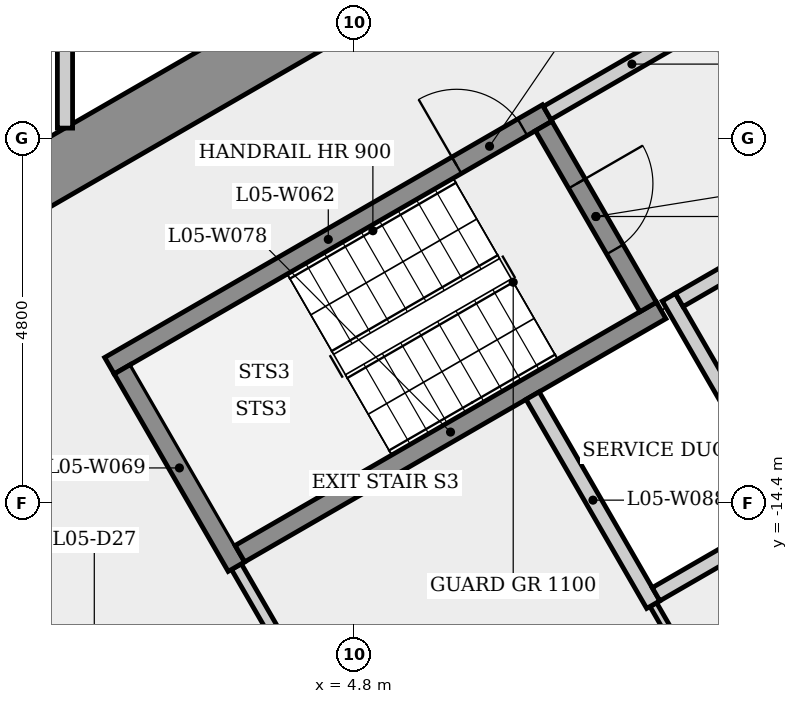
"""IFC4 building model, lengths in metres.
Left out: names, types, materials, properties, quantities, classifications, styles, units other than length and angle.
Written with IfcOpenShell. Run it as: python <this file> out.ifc"""

import sys

from ifc_helpers import new_model, si_unit, direction, frame, frame_2d, origin, place, context, subcontext, project, spatial, rectangle, extrude, element, fill, save


model = new_model("IFC4")
c1 = context("Model", 3, precision=1e-05, world=origin(), true_north=direction((0.0, 1.0)))
c2 = subcontext(c1, "Body", "Model", "MODEL_VIEW")
j1 = project(units=[si_unit("LENGTHUNIT", "METRE"), si_unit("PLANEANGLEUNIT", "RADIAN")], contexts=[c1])
p1 = place(None, origin())
s1 = spatial("IfcSite", under=j1, at=p1, CompositionType="ELEMENT")
p2 = place(p1, origin())
s2 = spatial("IfcBuilding", under=s1, at=p2, CompositionType="ELEMENT")
p3 = place(p2, frame((0.0, 0.0, 25.5)))
s3 = spatial("IfcBuildingStorey", under=s2, at=p3, CompositionType="ELEMENT", Elevation=25.5)
p4 = place(p3, frame((-0.2, -10.623, 0.0), z_axis=(0.0, 0.0, 1.0), x_axis=(0.866023993627, 0.500002442456, 0.0)))
e1 = element("IfcWall", 1, at=p4, inside=s3, PredefinedType="SHEAR", context=c2, shape_type="SweptSolid", body=[
    extrude(rectangle(XDim=10.97, YDim=0.8, at=frame_2d((5.485, 0.0))), origin(), (0.0, 0.0, 1.0), 3.4),
])
p5 = place(p4, frame((7.224, 0.0, 0.0)))
e2 = element("IfcOpeningElement", 2, at=p5, cuts=e1, PredefinedType="OPENING", context=c2, shape_type="SweptSolid", body=[
    extrude(rectangle(XDim=0.9, YDim=2.1, at=frame_2d((0.45, 1.05))), frame((0.0, 0.41, 0.0), z_axis=(0.0, -1.0, 0.0), x_axis=(1.0, 0.0, 0.0)), (0.0, 0.0, 1.0), 0.82),
])
p6 = place(p3, frame((1.0, -5.275, 0.0), z_axis=(0.0, 0.0, 1.0), x_axis=(0.0, -1.0, 0.0)))
e3 = element("IfcWall", 3, at=p6, inside=s3, PredefinedType="PARTITIONING", context=c2, shape_type="SweptSolid", body=[
    extrude(rectangle(XDim=4.194, YDim=0.2, at=frame_2d((2.097, 0.0))), origin(), (0.0, 0.0, 1.0), 3.05),
])
p7 = place(p3, frame((1.585, -12.595, 0.0), z_axis=(0.0, 0.0, 1.0), x_axis=(0.866036417653, 0.499980922934, 0.0)))
e4 = element("IfcWall", 4, at=p7, inside=s3, PredefinedType="SHEAR", context=c2, shape_type="SweptSolid", body=[
    extrude(rectangle(XDim=6.65, YDim=0.25, at=frame_2d((3.325, 0.0))), origin(), (0.0, 0.0, 1.0), 3.05),
])
p8 = place(p7, frame((5.275, 0.0, 0.0)))
e5 = element("IfcOpeningElement", 5, at=p8, cuts=e4, PredefinedType="OPENING", context=c2, shape_type="SweptSolid", body=[
    extrude(rectangle(XDim=1.0, YDim=2.1, at=frame_2d((0.5, 1.05))), frame((0.0, 0.135, 0.0), z_axis=(0.0, -1.0, 0.0), x_axis=(1.0, 0.0, 0.0)), (0.0, 0.0, 1.0), 0.27),
])
p9 = place(p3, frame((3.256, -15.239, 0.0), z_axis=(0.0, 0.0, 1.0), x_axis=(0.499974444137, -0.866040157966, 0.0)))
e6 = element("IfcWall", 6, at=p9, inside=s3, PredefinedType="PARTITIONING", context=c2, shape_type="SweptSolid", body=[
    extrude(rectangle(XDim=1.342, YDim=0.15, at=frame_2d((0.671, 0.0))), origin(), (0.0, 0.0, 1.0), 3.05),
])
p10 = place(p3, frame((3.256, -15.239, 0.0), z_axis=(0.0, 0.0, 1.0), x_axis=(-0.50002537861, 0.866010750942, 0.0)))
e7 = element("IfcWall", 7, at=p10, inside=s3, PredefinedType="SHEAR", context=c2, shape_type="SweptSolid", body=[
    extrude(rectangle(XDim=3.0, YDim=0.25, at=frame_2d((1.5, 0.0))), origin(), (0.0, 0.0, 1.0), 3.05),
])
p11 = place(p3, frame((3.301, -15.068, 0.0), z_axis=(0.0, 0.0, 1.0), x_axis=(0.866035036182, 0.499983315828, 0.0)))
e8 = element("IfcWall", 8, at=p11, inside=s3, PredefinedType="SHEAR", context=c2, shape_type="SweptSolid", body=[
    extrude(rectangle(XDim=6.4, YDim=0.25, at=frame_2d((3.2, 0.0))), origin(), (0.0, 0.0, 1.0), 3.05),
])
p12 = place(p3, frame((7.298, -9.441, 0.0), z_axis=(0.0, 0.0, 1.0), x_axis=(0.500034990121, -0.866005201286, 0.0)))
e9 = element("IfcWall", 9, at=p12, inside=s3, PredefinedType="SHEAR", context=c2, shape_type="SweptSolid", body=[
    extrude(rectangle(XDim=2.75, YDim=0.25, at=frame_2d((1.375, 0.0))), origin(), (0.0, 0.0, 1.0), 3.05),
])
p13 = place(p12, frame((0.875, 0.0, 0.0)))
e10 = element("IfcOpeningElement", 10, at=p13, cuts=e9, PredefinedType="OPENING", context=c2, shape_type="SweptSolid", body=[
    extrude(rectangle(XDim=1.0, YDim=2.1, at=frame_2d((0.5, 1.05))), frame((0.0, 0.135, 0.0), z_axis=(0.0, -1.0, 0.0), x_axis=(1.0, 0.0, 0.0)), (0.0, 0.0, 1.0), 0.27),
])
p14 = place(p3, frame((7.344, -9.27, 0.0), z_axis=(0.0, 0.0, 1.0), x_axis=(0.866005588531, 0.500034319456, 0.0)))
e11 = element("IfcWall", 11, at=p14, inside=s3, PredefinedType="PARTITIONING", context=c2, shape_type="SweptSolid", body=[
    extrude(rectangle(XDim=2.575, YDim=0.2, at=frame_2d((1.288, 0.0))), origin(), (0.0, 0.0, 1.0), 3.05),
])
p15 = place(p3, frame((8.74, -15.738, 0.0), z_axis=(0.0, 0.0, 1.0), x_axis=(0.4999912383, -0.866030462295, 0.0)))
e12 = element("IfcWall", 12, at=p15, inside=s3, PredefinedType="PARTITIONING", context=c2, shape_type="SweptSolid", body=[
    extrude(rectangle(XDim=3.381, YDim=0.1, at=frame_2d((1.69, 0.0))), origin(), (0.0, 0.0, 1.0), 3.05),
])
p16 = place(p3, frame((8.74, -15.739, 0.0), z_axis=(0.0, 0.0, 1.0), x_axis=(-0.500017526161, 0.866015284814, 0.0)))
e13 = element("IfcWall", 13, at=p16, inside=s3, PredefinedType="PLUMBINGWALL", context=c2, shape_type="SweptSolid", body=[
    extrude(rectangle(XDim=3.175, YDim=0.2, at=frame_2d((1.588, 0.0))), origin(), (0.0, 0.0, 1.0), 3.05),
])
p17 = place(p3, frame((8.945, -11.694, 0.0), z_axis=(0.0, 0.0, 1.0), x_axis=(0.500062241894, -0.865989465428, 0.0)))
e14 = element("IfcWall", 14, at=p17, inside=s3, PredefinedType="PLUMBINGWALL", context=c2, shape_type="SweptSolid", body=[
    extrude(rectangle(XDim=3.4, YDim=0.2, at=frame_2d((1.7, 0.0))), origin(), (0.0, 0.0, 1.0), 3.05),
])
p18 = place(p3, frame((9.537, -8.119, 0.0), z_axis=(0.0, 0.0, 1.0), x_axis=(0.499990139034, -0.866031096941, 0.0)))
e15 = element("IfcWall", 15, at=p18, inside=s3, PredefinedType="PARTITIONING", context=c2, shape_type="SweptSolid", body=[
    extrude(rectangle(XDim=3.0, YDim=0.2, at=frame_2d((1.5, 0.0))), origin(), (0.0, 0.0, 1.0), 3.05),
])
p19 = place(p18, frame((0.935, 0.0, 0.0)))
e16 = element("IfcOpeningElement", 16, at=p19, cuts=e15, PredefinedType="OPENING", context=c2, shape_type="SweptSolid", body=[
    extrude(rectangle(XDim=1.0, YDim=2.1, at=frame_2d((0.5, 1.05))), frame((0.0, 0.11, 0.0), z_axis=(0.0, -1.0, 0.0), x_axis=(1.0, 0.0, 0.0)), (0.0, 0.0, 1.0), 0.22),
])
p20 = place(p3, frame((10.509, -14.602, 0.0), z_axis=(0.0, 0.0, 1.0), x_axis=(-0.866010750942, -0.50002537861, 0.0)))
e17 = element("IfcWall", 17, at=p20, inside=s3, PredefinedType="PLUMBINGWALL", context=c2, shape_type="SweptSolid", body=[
    extrude(rectangle(XDim=2.0, YDim=0.2, at=frame_2d((1.0, 0.0))), origin(), (0.0, 0.0, 1.0), 3.05),
])
p21 = place(p3, frame((10.901, -10.681, 0.0), z_axis=(0.0, 0.0, 1.0), x_axis=(-0.866009402589, -0.500027713859, 0.0)))
e18 = element("IfcWall", 18, at=p21, inside=s3, PredefinedType="PARTITIONING", context=c2, shape_type="SweptSolid", body=[
    extrude(rectangle(XDim=2.1, YDim=0.2, at=frame_2d((1.05, 0.0))), origin(), (0.0, 0.0, 1.0), 3.05),
])
p22 = place(p8, origin())
e19 = element("IfcDoor", 19, at=p22, inside=s3, OperationType="SINGLE_SWING_LEFT", PredefinedType="DOOR", context=c2, shape_type="SweptSolid", body=[
    extrude(rectangle(XDim=1.0, YDim=2.1, at=frame_2d((0.5, 1.05))), frame((0.0, 0.025, 0.0), z_axis=(0.0, -1.0, 0.0), x_axis=(1.0, 0.0, 0.0)), (0.0, 0.0, 1.0), 0.05),
])
fill(e5, e19)
p23 = place(p13, origin())
e20 = element("IfcDoor", 20, at=p23, inside=s3, OperationType="SINGLE_SWING_LEFT", PredefinedType="DOOR", context=c2, shape_type="SweptSolid", body=[
    extrude(rectangle(XDim=1.0, YDim=2.1, at=frame_2d((0.5, 1.05))), frame((0.0, 0.025, 0.0), z_axis=(0.0, -1.0, 0.0), x_axis=(1.0, 0.0, 0.0)), (0.0, 0.0, 1.0), 0.05),
])
fill(e10, e20)
save(model, sys.argv[1])
